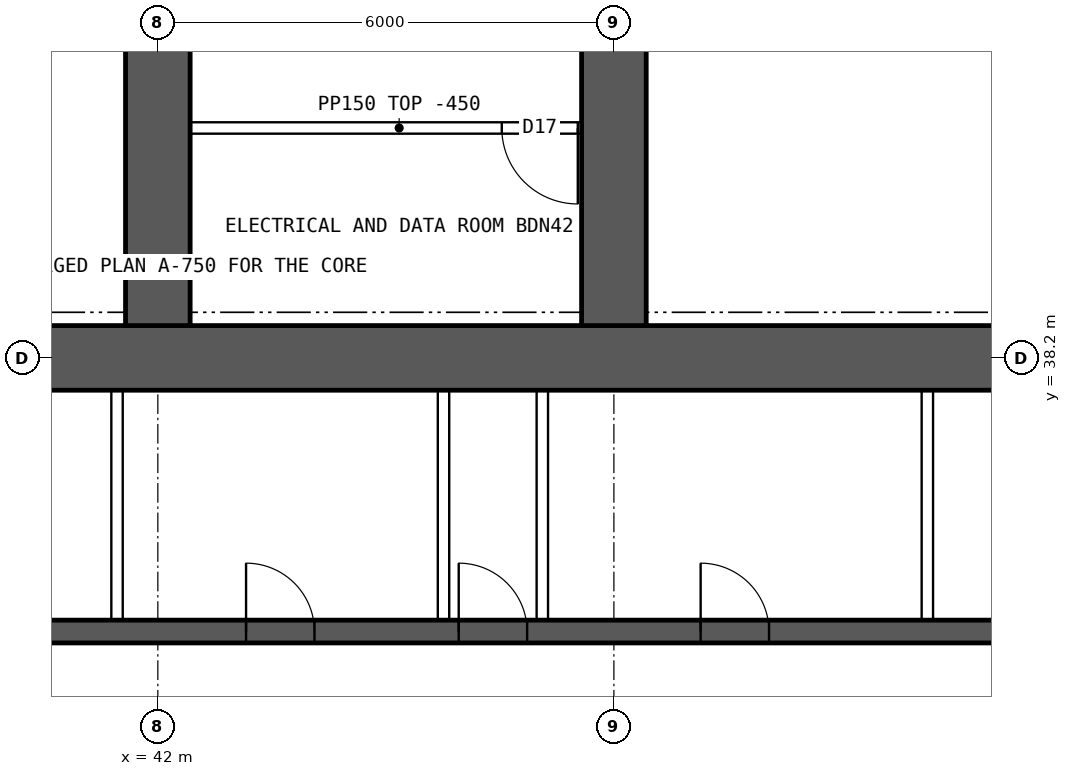
"""IFC4 building model, lengths in metres.
Left out: names, types, materials, properties, quantities, classifications, styles, units other than length and angle.
Written with IfcOpenShell. Run it as: python <this file> out.ifc"""

import sys

from ifc_helpers import new_model, si_unit, direction, frame, frame_2d, origin, place, context, subcontext, project, spatial, rectangle, extrude, element, fill, save


model = new_model("IFC4")
c1 = context("Model", 3, precision=1e-05, world=origin(), true_north=direction((0.0, 1.0)))
c2 = subcontext(c1, "Body", "Model", "MODEL_VIEW")
j1 = project(units=[si_unit("LENGTHUNIT", "METRE"), si_unit("PLANEANGLEUNIT", "RADIAN")], contexts=[c1])
p1 = place(None, origin())
s1 = spatial("IfcSite", under=j1, at=p1, CompositionType="ELEMENT")
p2 = place(p1, origin())
s2 = spatial("IfcBuilding", under=s1, at=p2, CompositionType="ELEMENT")
p3 = place(p2, frame((0.0, 0.0, 189.85)))
s3 = spatial("IfcBuildingStorey", under=s2, at=p3, CompositionType="ELEMENT", Elevation=189.85)
p4 = place(p3, frame((18.0, 38.2, 0.0), z_axis=(0.0, 0.0, 1.0), x_axis=(1.0, 0.0, 0.0)))
e1 = element("IfcWall", 1, at=p4, inside=s3, PredefinedType="SHEAR", context=c2, shape_type="SweptSolid", body=[
    extrude(rectangle(XDim=48.0, YDim=0.85, at=frame_2d((24.0, 0.0))), origin(), (0.0, 0.0, 1.0), 3.75),
])
p5 = place(p3, frame((18.425, 34.6, 0.0), z_axis=(0.0, 0.0, 1.0), x_axis=(1.0, 0.0, 0.0)))
e2 = element("IfcWall", 2, at=p5, inside=s3, PredefinedType="SHEAR", context=c2, shape_type="SweptSolid", body=[
    extrude(rectangle(XDim=47.15, YDim=0.3, at=frame_2d((23.575, 0.0))), origin(), (0.0, 0.0, 1.0), 3.75),
])
p6 = place(p5, frame((0.9, 0.0, 0.0)))
e3 = element("IfcOpeningElement", 3, at=p6, cuts=e2, PredefinedType="OPENING", context=c2, shape_type="SweptSolid", body=[
    extrude(rectangle(XDim=1.1, YDim=2.1, at=frame_2d((0.55, 1.05))), frame((0.0, 0.16, 0.0), z_axis=(0.0, -1.0, 0.0), x_axis=(1.0, 0.0, 0.0)), (0.0, 0.0, 1.0), 0.32),
])
p7 = place(p5, frame((45.15, 0.0, 0.0)))
e4 = element("IfcOpeningElement", 4, at=p7, cuts=e2, PredefinedType="OPENING", context=c2, shape_type="SweptSolid", body=[
    extrude(rectangle(XDim=1.1, YDim=2.1, at=frame_2d((0.55, 1.05))), frame((0.0, 0.16, 0.0), z_axis=(0.0, -1.0, 0.0), x_axis=(1.0, 0.0, 0.0)), (0.0, 0.0, 1.0), 0.32),
])
p8 = place(p5, frame((4.175, 0.0, 0.0)))
e5 = element("IfcOpeningElement", 5, at=p8, cuts=e2, PredefinedType="OPENING", context=c2, shape_type="SweptSolid", body=[
    extrude(rectangle(XDim=0.9, YDim=2.1, at=frame_2d((0.45, 1.05))), frame((0.0, 0.16, 0.0), z_axis=(0.0, -1.0, 0.0), x_axis=(1.0, 0.0, 0.0)), (0.0, 0.0, 1.0), 0.32),
])
p9 = place(p5, frame((42.075, 0.0, 0.0)))
e6 = element("IfcOpeningElement", 6, at=p9, cuts=e2, PredefinedType="OPENING", context=c2, shape_type="SweptSolid", body=[
    extrude(rectangle(XDim=0.9, YDim=2.1, at=frame_2d((0.45, 1.05))), frame((0.0, 0.16, 0.0), z_axis=(0.0, -1.0, 0.0), x_axis=(1.0, 0.0, 0.0)), (0.0, 0.0, 1.0), 0.32),
])
p10 = place(p5, frame((8.95, 0.0, 0.0)))
e7 = element("IfcOpeningElement", 7, at=p10, cuts=e2, PredefinedType="OPENING", context=c2, shape_type="SweptSolid", body=[
    extrude(rectangle(XDim=0.9, YDim=2.1, at=frame_2d((0.45, 1.05))), frame((0.0, 0.16, 0.0), z_axis=(0.0, -1.0, 0.0), x_axis=(1.0, 0.0, 0.0)), (0.0, 0.0, 1.0), 0.32),
])
p11 = place(p5, frame((12.924, 0.0, 0.0)))
e8 = element("IfcOpeningElement", 8, at=p11, cuts=e2, PredefinedType="OPENING", context=c2, shape_type="SweptSolid", body=[
    extrude(rectangle(XDim=0.9, YDim=2.1, at=frame_2d((0.45, 1.05))), frame((0.0, 0.16, 0.0), z_axis=(0.0, -1.0, 0.0), x_axis=(1.0, 0.0, 0.0)), (0.0, 0.0, 1.0), 0.32),
])
p12 = place(p5, frame((16.571, 0.0, 0.0)))
e9 = element("IfcOpeningElement", 9, at=p12, cuts=e2, PredefinedType="OPENING", context=c2, shape_type="SweptSolid", body=[
    extrude(rectangle(XDim=0.9, YDim=2.1, at=frame_2d((0.45, 1.05))), frame((0.0, 0.16, 0.0), z_axis=(0.0, -1.0, 0.0), x_axis=(1.0, 0.0, 0.0)), (0.0, 0.0, 1.0), 0.32),
])
p13 = place(p5, frame((20.33, 0.0, 0.0)))
e10 = element("IfcOpeningElement", 10, at=p13, cuts=e2, PredefinedType="OPENING", context=c2, shape_type="SweptSolid", body=[
    extrude(rectangle(XDim=0.9, YDim=2.1, at=frame_2d((0.45, 1.05))), frame((0.0, 0.16, 0.0), z_axis=(0.0, -1.0, 0.0), x_axis=(1.0, 0.0, 0.0)), (0.0, 0.0, 1.0), 0.32),
])
p14 = place(p5, frame((24.736, 0.0, 0.0)))
e11 = element("IfcOpeningElement", 11, at=p14, cuts=e2, PredefinedType="OPENING", context=c2, shape_type="SweptSolid", body=[
    extrude(rectangle(XDim=0.9, YDim=2.1, at=frame_2d((0.45, 1.05))), frame((0.0, 0.16, 0.0), z_axis=(0.0, -1.0, 0.0), x_axis=(1.0, 0.0, 0.0)), (0.0, 0.0, 1.0), 0.32),
])
p15 = place(p5, frame((27.533, 0.0, 0.0)))
e12 = element("IfcOpeningElement", 12, at=p15, cuts=e2, PredefinedType="OPENING", context=c2, shape_type="SweptSolid", body=[
    extrude(rectangle(XDim=0.9, YDim=2.1, at=frame_2d((0.45, 1.05))), frame((0.0, 0.16, 0.0), z_axis=(0.0, -1.0, 0.0), x_axis=(1.0, 0.0, 0.0)), (0.0, 0.0, 1.0), 0.32),
])
p16 = place(p5, frame((30.716, 0.0, 0.0)))
e13 = element("IfcOpeningElement", 13, at=p16, cuts=e2, PredefinedType="OPENING", context=c2, shape_type="SweptSolid", body=[
    extrude(rectangle(XDim=0.9, YDim=2.1, at=frame_2d((0.45, 1.05))), frame((0.0, 0.16, 0.0), z_axis=(0.0, -1.0, 0.0), x_axis=(1.0, 0.0, 0.0)), (0.0, 0.0, 1.0), 0.32),
])
p17 = place(p5, frame((34.667, 0.0, 0.0)))
e14 = element("IfcOpeningElement", 14, at=p17, cuts=e2, PredefinedType="OPENING", context=c2, shape_type="SweptSolid", body=[
    extrude(rectangle(XDim=0.9, YDim=2.1, at=frame_2d((0.45, 1.05))), frame((0.0, 0.16, 0.0), z_axis=(0.0, -1.0, 0.0), x_axis=(1.0, 0.0, 0.0)), (0.0, 0.0, 1.0), 0.32),
])
p18 = place(p5, frame((37.605, 0.0, 0.0)))
e15 = element("IfcOpeningElement", 15, at=p18, cuts=e2, PredefinedType="OPENING", context=c2, shape_type="SweptSolid", body=[
    extrude(rectangle(XDim=0.9, YDim=2.1, at=frame_2d((0.45, 1.05))), frame((0.0, 0.16, 0.0), z_axis=(0.0, -1.0, 0.0), x_axis=(1.0, 0.0, 0.0)), (0.0, 0.0, 1.0), 0.32),
])
for number, where, z_axis, x_axis in (
    (16, (42.0, 38.625, 0.0), (0.0, 0.0, 1.0), (0.0, 1.0, 0.0)),
    (17, (48.0, 38.625, 0.0), (0.0, 0.0, 1.0), (0.0, 1.0, 0.0)),
):
    element("IfcWall", number, at=place(p3, frame(where, z_axis=z_axis, x_axis=x_axis)), inside=s3, PredefinedType="SHEAR", context=c2, shape_type="SweptSolid", body=[
        extrude(rectangle(XDim=8.175, YDim=0.85, at=frame_2d((4.087, 0.0))), origin(), (0.0, 0.0, 1.0), 3.75),
    ])
for number, where, z_axis, x_axis in (
    (18, (41.463, 34.75, 0.0), (0.0, 0.0, 1.0), (0.0, 1.0, 0.0)),
    (19, (45.758, 34.75, 0.0), (0.0, 0.0, 1.0), (0.0, 1.0, 0.0)),
    (20, (47.058, 34.75, 0.0), (0.0, 0.0, 1.0), (0.0, 1.0, 0.0)),
    (21, (52.124, 34.75, 0.0), (0.0, 0.0, 1.0), (0.0, 1.0, 0.0)),
):
    element("IfcWall", number, at=place(p3, frame(where, z_axis=z_axis, x_axis=x_axis)), inside=s3, PredefinedType="SOLIDWALL", context=c2, shape_type="SweptSolid", body=[
        extrude(rectangle(XDim=3.025, YDim=0.15, at=frame_2d((1.512, 0.0))), origin(), (0.0, 0.0, 1.0), 3.3),
    ])
p19 = place(p3, frame((47.925, 41.225, 0.0), z_axis=(0.0, 0.0, 1.0), x_axis=(-1.0, 0.0, 0.0)))
e22 = element("IfcWall", 22, at=p19, inside=s3, PredefinedType="PARTITIONING", context=c2, shape_type="SweptSolid", body=[
    extrude(rectangle(XDim=5.5, YDim=0.15, at=frame_2d((2.75, 0.0))), origin(), (0.0, 0.0, 1.0), 3.3),
])
p20 = place(p19, frame((0.4, 0.0, 0.0)))
e23 = element("IfcOpeningElement", 23, at=p20, cuts=e22, PredefinedType="OPENING", context=c2, shape_type="SweptSolid", body=[
    extrude(rectangle(XDim=1.0, YDim=2.1, at=frame_2d((0.5, 1.05))), frame((0.0, 0.085, 0.0), z_axis=(0.0, -1.0, 0.0), x_axis=(1.0, 0.0, 0.0)), (0.0, 0.0, 1.0), 0.17),
])
p21 = place(p14, origin())
e24 = element("IfcDoor", 24, at=p21, inside=s3, OperationType="SINGLE_SWING_LEFT", PredefinedType="DOOR", context=c2, shape_type="SweptSolid", body=[
    extrude(rectangle(XDim=0.9, YDim=2.1, at=frame_2d((0.45, 1.05))), frame((0.0, 0.025, 0.0), z_axis=(0.0, -1.0, 0.0), x_axis=(1.0, 0.0, 0.0)), (0.0, 0.0, 1.0), 0.05),
])
fill(e11, e24)
p22 = place(p15, origin())
e25 = element("IfcDoor", 25, at=p22, inside=s3, OperationType="SINGLE_SWING_LEFT", PredefinedType="DOOR", context=c2, shape_type="SweptSolid", body=[
    extrude(rectangle(XDim=0.9, YDim=2.1, at=frame_2d((0.45, 1.05))), frame((0.0, 0.025, 0.0), z_axis=(0.0, -1.0, 0.0), x_axis=(1.0, 0.0, 0.0)), (0.0, 0.0, 1.0), 0.05),
])
fill(e12, e25)
p23 = place(p16, origin())
e26 = element("IfcDoor", 26, at=p23, inside=s3, OperationType="SINGLE_SWING_LEFT", PredefinedType="DOOR", context=c2, shape_type="SweptSolid", body=[
    extrude(rectangle(XDim=0.9, YDim=2.1, at=frame_2d((0.45, 1.05))), frame((0.0, 0.025, 0.0), z_axis=(0.0, -1.0, 0.0), x_axis=(1.0, 0.0, 0.0)), (0.0, 0.0, 1.0), 0.05),
])
fill(e13, e26)
p24 = place(p20, origin())
e27 = element("IfcDoor", 27, at=p24, inside=s3, OperationType="SINGLE_SWING_LEFT", PredefinedType="DOOR", context=c2, shape_type="SweptSolid", body=[
    extrude(rectangle(XDim=1.0, YDim=2.1, at=frame_2d((0.5, 1.05))), frame((0.0, 0.025, 0.0), z_axis=(0.0, -1.0, 0.0), x_axis=(1.0, 0.0, 0.0)), (0.0, 0.0, 1.0), 0.05),
])
fill(e23, e27)
save(model, sys.argv[1])
